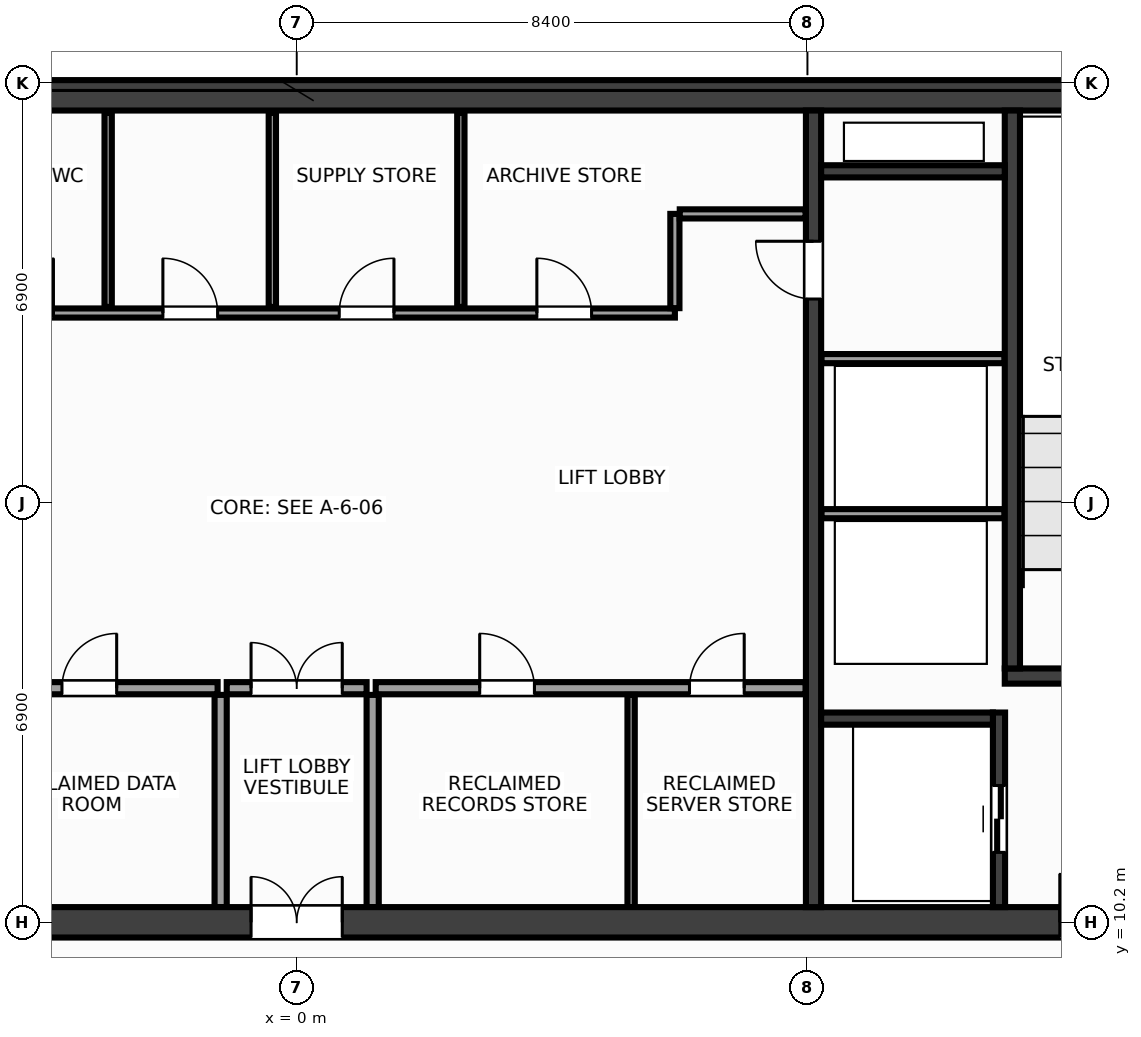
"""IFC4 building model, lengths in metres.
Left out: names, types, materials, properties, quantities, classifications, styles, units other than length and angle.
Written with IfcOpenShell. Run it as: python <this file> out.ifc"""

import sys

from ifc_helpers import new_model, si_unit, direction, frame, frame_2d, origin, place, context, subcontext, project, spatial, rectangle, extrude, source, transform, mapped, element, fill, save


model = new_model("IFC4")
c1 = context("Model", 3, precision=1e-05, world=origin(), true_north=direction((0.0, 1.0)))
c2 = subcontext(c1, "Body", "Model", "MODEL_VIEW")
j1 = project(units=[si_unit("LENGTHUNIT", "METRE"), si_unit("PLANEANGLEUNIT", "RADIAN")], contexts=[c1])
p1 = place(None, origin())
s1 = spatial("IfcSite", under=j1, at=p1, CompositionType="ELEMENT")
p2 = place(p1, origin())
s2 = spatial("IfcBuilding", under=s1, at=p2, CompositionType="ELEMENT")
p3 = place(p2, frame((0.0, 0.0, 225.2)))
s3 = spatial("IfcBuildingStorey", under=s2, at=p3, CompositionType="ELEMENT", Elevation=225.2)
m1 = source(origin(), c2, "Body", "SweptSolid", [
    extrude(rectangle(XDim=31.7, YDim=0.5, at=frame_2d((15.85, 0.0))), origin(), (0.0, 0.0, 1.0), 3.6),
])
p4 = place(p3, frame((-15.85, 23.8, 0.0), z_axis=(0.0, 0.0, 1.0), x_axis=(1.0, 0.0, 0.0)))
e1 = element("IfcWall", 1, at=p4, inside=s3, PredefinedType="SHEAR", context=c2, shape_type="MappedRepresentation", body=[
    mapped(m1, transform((0.0, 0.0, 0.0), x_axis=(1.0, 0.0, 0.0), y_axis=(0.0, 1.0, 0.0), z_axis=(0.0, 0.0, 1.0), scale=1.0)),
])
p5 = place(p3, frame((-15.85, 10.2, 0.0), z_axis=(0.0, 0.0, 1.0), x_axis=(1.0, 0.0, 0.0)))
e2 = element("IfcWall", 2, at=p5, inside=s3, PredefinedType="SHEAR", context=c2, shape_type="MappedRepresentation", body=[
    mapped(m1, transform((0.0, 0.0, 0.0), x_axis=(1.0, 0.0, 0.0), y_axis=(0.0, 1.0, 0.0), z_axis=(0.0, 0.0, 1.0), scale=1.0)),
])
p6 = place(p5, frame((1.7, 0.0, 0.0)))
e3 = element("IfcOpeningElement", 3, at=p6, cuts=e2, PredefinedType="OPENING", context=c2, shape_type="SweptSolid", body=[
    extrude(rectangle(XDim=1.6, YDim=2.15, at=frame_2d((0.8, 1.075))), frame((0.0, 0.262, 0.0), z_axis=(0.0, -1.0, 0.0), x_axis=(1.0, 0.0, 0.0)), (0.0, 0.0, 1.0), 0.524),
])
p7 = place(p5, frame((28.4, 0.0, 0.0)))
e4 = element("IfcOpeningElement", 4, at=p7, cuts=e2, PredefinedType="OPENING", context=c2, shape_type="SweptSolid", body=[
    extrude(rectangle(XDim=1.6, YDim=2.15, at=frame_2d((0.8, 1.075))), frame((0.0, 0.262, 0.0), z_axis=(0.0, -1.0, 0.0), x_axis=(1.0, 0.0, 0.0)), (0.0, 0.0, 1.0), 0.524),
])
p8 = place(p5, frame((15.1, 0.0, 0.0)))
e5 = element("IfcOpeningElement", 5, at=p8, cuts=e2, PredefinedType="OPENING", context=c2, shape_type="SweptSolid", body=[
    extrude(rectangle(XDim=1.5, YDim=2.2, at=frame_2d((0.75, 1.1))), frame((0.0, 0.262, 0.0), z_axis=(0.0, -1.0, 0.0), x_axis=(1.0, 0.0, 0.0)), (0.0, 0.0, 1.0), 0.524),
])
m2 = source(origin(), c2, "Body", "SweptSolid", [
    extrude(rectangle(XDim=13.1, YDim=0.25, at=frame_2d((6.55, 0.0))), origin(), (0.0, 0.0, 1.0), 3.6),
])
p9 = place(p3, frame((8.5, 10.45, 0.0), z_axis=(0.0, 0.0, 1.0), x_axis=(0.0, 1.0, 0.0)))
e6 = element("IfcWall", 6, at=p9, inside=s3, PredefinedType="SHEAR", context=c2, shape_type="MappedRepresentation", body=[
    mapped(m2, transform((0.0, 0.0, 0.0), x_axis=(1.0, 0.0, 0.0), y_axis=(0.0, 1.0, 0.0), z_axis=(0.0, 0.0, 1.0), scale=1.0)),
])
p10 = place(p9, frame((10.0, 0.0, 0.0)))
e7 = element("IfcOpeningElement", 7, at=p10, cuts=e6, PredefinedType="OPENING", context=c2, shape_type="SweptSolid", body=[
    extrude(rectangle(XDim=0.95, YDim=2.15, at=frame_2d((0.475, 1.075))), frame((0.0, 0.137, 0.0), z_axis=(0.0, -1.0, 0.0), x_axis=(1.0, 0.0, 0.0)), (0.0, 0.0, 1.0), 0.274),
])
m3 = source(origin(), c2, "Body", "SweptSolid", [
    extrude(rectangle(XDim=3.705, YDim=0.25, at=frame_2d((1.853, 0.0))), origin(), (0.0, 0.0, 1.0), 3.6),
])
p11 = place(p3, frame((11.645, 14.25, 0.0), z_axis=(0.0, 0.0, 1.0), x_axis=(1.0, 0.0, 0.0)))
e8 = element("IfcWall", 8, at=p11, inside=s3, PredefinedType="SHEAR", context=c2, shape_type="MappedRepresentation", body=[
    mapped(m3, transform((0.0, 0.0, 0.0), x_axis=(1.0, 0.0, 0.0), y_axis=(0.0, 1.0, 0.0), z_axis=(0.0, 0.0, 1.0), scale=1.0)),
])
p12 = place(p11, frame((0.95, 0.0, 0.0)))
e9 = element("IfcOpeningElement", 9, at=p12, cuts=e8, PredefinedType="OPENING", context=c2, shape_type="SweptSolid", body=[
    extrude(rectangle(XDim=1.6, YDim=2.15, at=frame_2d((0.8, 1.075))), frame((0.0, 0.137, 0.0), z_axis=(0.0, -1.0, 0.0), x_axis=(1.0, 0.0, 0.0)), (0.0, 0.0, 1.0), 0.274),
])
m4 = source(origin(), c2, "Body", "SweptSolid", [
    extrude(rectangle(XDim=9.175, YDim=0.25, at=frame_2d((4.587, 0.0))), origin(), (0.0, 0.0, 1.0), 3.6),
])
p13 = place(p3, frame((11.77, 14.375, 0.0), z_axis=(0.0, 0.0, 1.0), x_axis=(0.0, 1.0, 0.0)))
e10 = element("IfcWall", 10, at=p13, inside=s3, PredefinedType="SHEAR", context=c2, shape_type="MappedRepresentation", body=[
    mapped(m4, transform((0.0, 0.0, 0.0), x_axis=(1.0, 0.0, 0.0), y_axis=(0.0, 1.0, 0.0), z_axis=(0.0, 0.0, 1.0), scale=1.0)),
])
m5 = source(origin(), c2, "Body", "SweptSolid", [
    extrude(rectangle(XDim=3.2, YDim=0.2, at=frame_2d((1.6, 0.0))), origin(), (0.0, 0.0, 1.0), 3.6),
])
p14 = place(p3, frame((11.55, 10.45, 0.0), z_axis=(0.0, 0.0, 1.0), x_axis=(0.0, 1.0, 0.0)))
e11 = element("IfcWall", 11, at=p14, inside=s3, PredefinedType="SHEAR", context=c2, shape_type="MappedRepresentation", body=[
    mapped(m5, transform((0.0, 0.0, 0.0), x_axis=(1.0, 0.0, 0.0), y_axis=(0.0, 1.0, 0.0), z_axis=(0.0, 0.0, 1.0), scale=1.0)),
])
p15 = place(p14, frame((0.9, 0.0, 0.0)))
e12 = element("IfcOpeningElement", 12, at=p15, cuts=e11, PredefinedType="OPENING", context=c2, shape_type="SweptSolid", body=[
    extrude(rectangle(XDim=1.1, YDim=2.15, at=frame_2d((0.55, 1.075))), frame((0.0, 0.112, 0.0), z_axis=(0.0, -1.0, 0.0), x_axis=(1.0, 0.0, 0.0)), (0.0, 0.0, 1.0), 0.224),
])
m6 = source(origin(), c2, "Body", "SweptSolid", [
    extrude(rectangle(XDim=2.825, YDim=0.2, at=frame_2d((1.413, 0.0))), origin(), (0.0, 0.0, 1.0), 3.6),
])
p16 = place(p3, frame((8.625, 13.55, 0.0), z_axis=(0.0, 0.0, 1.0), x_axis=(1.0, 0.0, 0.0)))
e13 = element("IfcWall", 13, at=p16, inside=s3, PredefinedType="SHEAR", context=c2, shape_type="MappedRepresentation", body=[
    mapped(m6, transform((0.0, 0.0, 0.0), x_axis=(1.0, 0.0, 0.0), y_axis=(0.0, 1.0, 0.0), z_axis=(0.0, 0.0, 1.0), scale=1.0)),
])
m7 = source(origin(), c2, "Body", "SweptSolid", [
    extrude(rectangle(XDim=3.02, YDim=0.2, at=frame_2d((1.51, 0.0))), origin(), (0.0, 0.0, 1.0), 3.6),
])
p17 = place(p3, frame((8.625, 22.55, 0.0), z_axis=(0.0, 0.0, 1.0), x_axis=(1.0, 0.0, 0.0)))
e14 = element("IfcWall", 14, at=p17, inside=s3, PredefinedType="SHEAR", context=c2, shape_type="MappedRepresentation", body=[
    mapped(m7, transform((0.0, 0.0, 0.0), x_axis=(1.0, 0.0, 0.0), y_axis=(0.0, 1.0, 0.0), z_axis=(0.0, 0.0, 1.0), scale=1.0)),
])
m8 = source(origin(), c2, "Body", "SweptSolid", [
    extrude(rectangle(XDim=3.01, YDim=0.15, at=frame_2d((1.505, 0.0))), origin(), (0.0, 0.0, 1.0), 3.28),
])
for number, where, z_axis, x_axis in (
    (15, (8.63, 16.92, 0.0), (0.0, 0.0, 1.0), (1.0, 0.0, 0.0)),
    (16, (8.63, 19.47, 0.0), (0.0, 0.0, 1.0), (1.0, 0.0, 0.0)),
):
    element("IfcWall", number, at=place(p3, frame(where, z_axis=z_axis, x_axis=x_axis)), inside=s3, PredefinedType="PARTITIONING", context=c2, shape_type="MappedRepresentation", body=[
        mapped(m8, transform((0.0, 0.0, 0.0), x_axis=(1.0, 0.0, 0.0), y_axis=(0.0, 1.0, 0.0), z_axis=(0.0, 0.0, 1.0), scale=1.0)),
    ])
m9 = source(origin(), c2, "Body", "SweptSolid", [
    extrude(rectangle(XDim=7.07, YDim=0.2, at=frame_2d((3.535, 0.0))), origin(), (0.0, 0.0, 1.0), 3.28),
])
p18 = place(p3, frame((-8.37, 14.05, 0.0), z_axis=(0.0, 0.0, 1.0), x_axis=(1.0, 0.0, 0.0)))
e17 = element("IfcWall", 17, at=p18, inside=s3, PredefinedType="PARTITIONING", context=c2, shape_type="MappedRepresentation", body=[
    mapped(m9, transform((0.0, 0.0, 0.0), x_axis=(1.0, 0.0, 0.0), y_axis=(0.0, 1.0, 0.0), z_axis=(0.0, 0.0, 1.0), scale=1.0)),
])
p19 = place(p18, frame((1.06, 0.0, 0.0)))
e18 = element("IfcOpeningElement", 18, at=p19, cuts=e17, PredefinedType="OPENING", context=c2, shape_type="SweptSolid", body=[
    extrude(rectangle(XDim=0.9, YDim=2.15, at=frame_2d((0.45, 1.075))), frame((0.0, 0.112, 0.0), z_axis=(0.0, -1.0, 0.0), x_axis=(1.0, 0.0, 0.0)), (0.0, 0.0, 1.0), 0.224),
])
p20 = place(p18, frame((4.51, 0.0, 0.0)))
e19 = element("IfcOpeningElement", 19, at=p20, cuts=e17, PredefinedType="OPENING", context=c2, shape_type="SweptSolid", body=[
    extrude(rectangle(XDim=0.9, YDim=2.15, at=frame_2d((0.45, 1.075))), frame((0.0, 0.112, 0.0), z_axis=(0.0, -1.0, 0.0), x_axis=(1.0, 0.0, 0.0)), (0.0, 0.0, 1.0), 0.224),
])
p21 = place(p3, frame((1.3, 14.05, 0.0), z_axis=(0.0, 0.0, 1.0), x_axis=(1.0, 0.0, 0.0)))
e20 = element("IfcWall", 20, at=p21, inside=s3, PredefinedType="PARTITIONING", context=c2, shape_type="MappedRepresentation", body=[
    mapped(m9, transform((0.0, 0.0, 0.0), x_axis=(1.0, 0.0, 0.0), y_axis=(0.0, 1.0, 0.0), z_axis=(0.0, 0.0, 1.0), scale=1.0)),
])
p22 = place(p21, frame((1.71, 0.0, 0.0)))
e21 = element("IfcOpeningElement", 21, at=p22, cuts=e20, PredefinedType="OPENING", context=c2, shape_type="SweptSolid", body=[
    extrude(rectangle(XDim=0.9, YDim=2.15, at=frame_2d((0.45, 1.075))), frame((0.0, 0.112, 0.0), z_axis=(0.0, -1.0, 0.0), x_axis=(1.0, 0.0, 0.0)), (0.0, 0.0, 1.0), 0.224),
])
p23 = place(p21, frame((5.16, 0.0, 0.0)))
e22 = element("IfcOpeningElement", 22, at=p23, cuts=e20, PredefinedType="OPENING", context=c2, shape_type="SweptSolid", body=[
    extrude(rectangle(XDim=0.9, YDim=2.15, at=frame_2d((0.45, 1.075))), frame((0.0, 0.112, 0.0), z_axis=(0.0, -1.0, 0.0), x_axis=(1.0, 0.0, 0.0)), (0.0, 0.0, 1.0), 0.224),
])
m10 = source(origin(), c2, "Body", "SweptSolid", [
    extrude(rectangle(XDim=3.49, YDim=0.2, at=frame_2d((1.745, 0.0))), origin(), (0.0, 0.0, 1.0), 3.28),
])
for number, where, z_axis, x_axis in (
    (23, (-1.25, 10.45, 0.0), (0.0, 0.0, 1.0), (0.0, 1.0, 0.0)),
    (24, (1.25, 10.45, 0.0), (0.0, 0.0, 1.0), (0.0, 1.0, 0.0)),
):
    element("IfcWall", number, at=place(p3, frame(where, z_axis=z_axis, x_axis=x_axis)), inside=s3, PredefinedType="PARTITIONING", context=c2, shape_type="MappedRepresentation", body=[
        mapped(m10, transform((0.0, 0.0, 0.0), x_axis=(1.0, 0.0, 0.0), y_axis=(0.0, 1.0, 0.0), z_axis=(0.0, 0.0, 1.0), scale=1.0)),
    ])
m11 = source(origin(), c2, "Body", "SweptSolid", [
    extrude(rectangle(XDim=2.3, YDim=0.2, at=frame_2d((1.15, 0.0))), origin(), (0.0, 0.0, 1.0), 3.28),
])
p24 = place(p3, frame((-1.15, 14.05, 0.0), z_axis=(0.0, 0.0, 1.0), x_axis=(1.0, 0.0, 0.0)))
e25 = element("IfcWall", 25, at=p24, inside=s3, PredefinedType="PARTITIONING", context=c2, shape_type="MappedRepresentation", body=[
    mapped(m11, transform((0.0, 0.0, 0.0), x_axis=(1.0, 0.0, 0.0), y_axis=(0.0, 1.0, 0.0), z_axis=(0.0, 0.0, 1.0), scale=1.0)),
])
p25 = place(p24, frame((0.4, 0.0, 0.0)))
e26 = element("IfcOpeningElement", 26, at=p25, cuts=e25, PredefinedType="OPENING", context=c2, shape_type="SweptSolid", body=[
    extrude(rectangle(XDim=1.5, YDim=2.2, at=frame_2d((0.75, 1.1))), frame((0.0, 0.112, 0.0), z_axis=(0.0, -1.0, 0.0), x_axis=(1.0, 0.0, 0.0)), (0.0, 0.0, 1.0), 0.224),
])
m12 = source(origin(), c2, "Body", "SweptSolid", [
    extrude(rectangle(XDim=14.59, YDim=0.15, at=frame_2d((7.295, 0.0))), origin(), (0.0, 0.0, 1.0), 3.28),
])
p26 = place(p3, frame((-8.37, 20.22, 0.0), z_axis=(0.0, 0.0, 1.0), x_axis=(1.0, 0.0, 0.0)))
e27 = element("IfcWall", 27, at=p26, inside=s3, PredefinedType="PARTITIONING", context=c2, shape_type="MappedRepresentation", body=[
    mapped(m12, transform((0.0, 0.0, 0.0), x_axis=(1.0, 0.0, 0.0), y_axis=(0.0, 1.0, 0.0), z_axis=(0.0, 0.0, 1.0), scale=1.0)),
])
p27 = place(p26, frame((0.86, 0.0, 0.0)))
e28 = element("IfcOpeningElement", 28, at=p27, cuts=e27, PredefinedType="OPENING", context=c2, shape_type="SweptSolid", body=[
    extrude(rectangle(XDim=0.9, YDim=2.15, at=frame_2d((0.45, 1.075))), frame((0.0, 0.087, 0.0), z_axis=(0.0, -1.0, 0.0), x_axis=(1.0, 0.0, 0.0)), (0.0, 0.0, 1.0), 0.174),
])
p28 = place(p26, frame((3.47, 0.0, 0.0)))
e29 = element("IfcOpeningElement", 29, at=p28, cuts=e27, PredefinedType="OPENING", context=c2, shape_type="SweptSolid", body=[
    extrude(rectangle(XDim=0.9, YDim=2.15, at=frame_2d((0.45, 1.075))), frame((0.0, 0.087, 0.0), z_axis=(0.0, -1.0, 0.0), x_axis=(1.0, 0.0, 0.0)), (0.0, 0.0, 1.0), 0.174),
])
p29 = place(p26, frame((6.17, 0.0, 0.0)))
e30 = element("IfcOpeningElement", 30, at=p29, cuts=e27, PredefinedType="OPENING", context=c2, shape_type="SweptSolid", body=[
    extrude(rectangle(XDim=0.9, YDim=2.15, at=frame_2d((0.45, 1.075))), frame((0.0, 0.087, 0.0), z_axis=(0.0, -1.0, 0.0), x_axis=(1.0, 0.0, 0.0)), (0.0, 0.0, 1.0), 0.174),
])
p30 = place(p26, frame((9.07, 0.0, 0.0)))
e31 = element("IfcOpeningElement", 31, at=p30, cuts=e27, PredefinedType="OPENING", context=c2, shape_type="SweptSolid", body=[
    extrude(rectangle(XDim=0.9, YDim=2.15, at=frame_2d((0.45, 1.075))), frame((0.0, 0.087, 0.0), z_axis=(0.0, -1.0, 0.0), x_axis=(1.0, 0.0, 0.0)), (0.0, 0.0, 1.0), 0.174),
])
p31 = place(p26, frame((12.32, 0.0, 0.0)))
e32 = element("IfcOpeningElement", 32, at=p31, cuts=e27, PredefinedType="OPENING", context=c2, shape_type="SweptSolid", body=[
    extrude(rectangle(XDim=0.9, YDim=2.15, at=frame_2d((0.45, 1.075))), frame((0.0, 0.087, 0.0), z_axis=(0.0, -1.0, 0.0), x_axis=(1.0, 0.0, 0.0)), (0.0, 0.0, 1.0), 0.174),
])
m13 = source(origin(), c2, "Body", "SweptSolid", [
    extrude(rectangle(XDim=1.55, YDim=0.15, at=frame_2d((0.775, 0.0))), origin(), (0.0, 0.0, 1.0), 3.28),
])
p32 = place(p3, frame((6.22, 20.3, 0.0), z_axis=(0.0, 0.0, 1.0), x_axis=(0.0, 1.0, 0.0)))
e33 = element("IfcWall", 33, at=p32, inside=s3, PredefinedType="PARTITIONING", context=c2, shape_type="MappedRepresentation", body=[
    mapped(m13, transform((0.0, 0.0, 0.0), x_axis=(1.0, 0.0, 0.0), y_axis=(0.0, 1.0, 0.0), z_axis=(0.0, 0.0, 1.0), scale=1.0)),
])
m14 = source(origin(), c2, "Body", "SweptSolid", [
    extrude(rectangle(XDim=2.07, YDim=0.15, at=frame_2d((1.035, 0.0))), origin(), (0.0, 0.0, 1.0), 3.28),
])
p33 = place(p3, frame((6.3, 21.85, 0.0), z_axis=(0.0, 0.0, 1.0), x_axis=(1.0, 0.0, 0.0)))
e34 = element("IfcWall", 34, at=p33, inside=s3, PredefinedType="PARTITIONING", context=c2, shape_type="MappedRepresentation", body=[
    mapped(m14, transform((0.0, 0.0, 0.0), x_axis=(1.0, 0.0, 0.0), y_axis=(0.0, 1.0, 0.0), z_axis=(0.0, 0.0, 1.0), scale=1.0)),
])
m15 = source(origin(), c2, "Body", "SweptSolid", [
    extrude(rectangle(XDim=3.49, YDim=0.12, at=frame_2d((1.745, 0.0))), origin(), (0.0, 0.0, 1.0), 3.28),
])
p34 = place(p3, frame((5.5, 10.45, 0.0), z_axis=(0.0, 0.0, 1.0), x_axis=(0.0, 1.0, 0.0)))
e35 = element("IfcWall", 35, at=p34, inside=s3, PredefinedType="PARTITIONING", context=c2, shape_type="MappedRepresentation", body=[
    mapped(m15, transform((0.0, 0.0, 0.0), x_axis=(1.0, 0.0, 0.0), y_axis=(0.0, 1.0, 0.0), z_axis=(0.0, 0.0, 1.0), scale=1.0)),
])
m16 = source(origin(), c2, "Body", "SweptSolid", [
    extrude(rectangle(XDim=3.19, YDim=0.12, at=frame_2d((1.595, 0.0))), origin(), (0.0, 0.0, 1.0), 3.28),
])
for number, where, z_axis, x_axis in (
    (36, (-3.1, 20.32, 0.0), (0.0, 0.0, 1.0), (0.0, 1.0, 0.0)),
    (37, (-0.4, 20.32, 0.0), (0.0, 0.0, 1.0), (0.0, 1.0, 0.0)),
    (38, (2.7, 20.32, 0.0), (0.0, 0.0, 1.0), (0.0, 1.0, 0.0)),
):
    element("IfcWall", number, at=place(p3, frame(where, z_axis=z_axis, x_axis=x_axis)), inside=s3, PredefinedType="PARTITIONING", context=c2, shape_type="MappedRepresentation", body=[
        mapped(m16, transform((0.0, 0.0, 0.0), x_axis=(1.0, 0.0, 0.0), y_axis=(0.0, 1.0, 0.0), z_axis=(0.0, 0.0, 1.0), scale=1.0)),
    ])
m17 = source(origin(), c2, "Body", "SweptSolid", [
    extrude(rectangle(XDim=1.6, YDim=2.15, at=frame_2d((0.8, 1.075))), frame((0.0, 0.025, 0.0), z_axis=(0.0, -1.0, 0.0), x_axis=(1.0, 0.0, 0.0)), (0.0, 0.0, 1.0), 0.05),
])
p35 = place(p7, origin())
e39 = element("IfcDoor", 39, at=p35, inside=s3, OperationType="DOUBLE_DOOR_SINGLE_SWING", PredefinedType="DOOR", context=c2, shape_type="MappedRepresentation", body=[
    mapped(m17, transform((0.0, 0.0, 0.0), x_axis=(1.0, 0.0, 0.0), y_axis=(0.0, 1.0, 0.0), z_axis=(0.0, 0.0, 1.0), scale=1.0)),
])
fill(e4, e39)
m18 = source(origin(), c2, "Body", "SweptSolid", [
    extrude(rectangle(XDim=1.1, YDim=2.15, at=frame_2d((0.55, 1.075))), frame((0.0, 0.025, 0.0), z_axis=(0.0, -1.0, 0.0), x_axis=(1.0, 0.0, 0.0)), (0.0, 0.0, 1.0), 0.05),
])
p36 = place(p15, origin())
e40 = element("IfcDoor", 40, at=p36, inside=s3, OperationType="DOUBLE_DOOR_SLIDING", PredefinedType="DOOR", context=c2, shape_type="MappedRepresentation", body=[
    mapped(m18, transform((0.0, 0.0, 0.0), x_axis=(1.0, 0.0, 0.0), y_axis=(0.0, 1.0, 0.0), z_axis=(0.0, 0.0, 1.0), scale=1.0)),
])
fill(e12, e40)
m19 = source(origin(), c2, "Body", "SweptSolid", [
    extrude(rectangle(XDim=0.95, YDim=2.15, at=frame_2d((0.475, 1.075))), frame((0.0, 0.025, 0.0), z_axis=(0.0, -1.0, 0.0), x_axis=(1.0, 0.0, 0.0)), (0.0, 0.0, 1.0), 0.05),
])
p37 = place(p10, origin())
e41 = element("IfcDoor", 41, at=p37, inside=s3, OperationType="SINGLE_SWING_RIGHT", PredefinedType="DOOR", context=c2, shape_type="MappedRepresentation", body=[
    mapped(m19, transform((0.0, 0.0, 0.0), x_axis=(1.0, 0.0, 0.0), y_axis=(0.0, 1.0, 0.0), z_axis=(0.0, 0.0, 1.0), scale=1.0)),
])
fill(e7, e41)
m20 = source(origin(), c2, "Body", "SweptSolid", [
    extrude(rectangle(XDim=0.9, YDim=2.15, at=frame_2d((0.45, 1.075))), frame((0.0, 0.025, 0.0), z_axis=(0.0, -1.0, 0.0), x_axis=(1.0, 0.0, 0.0)), (0.0, 0.0, 1.0), 0.05),
])
p38 = place(p20, origin())
e42 = element("IfcDoor", 42, at=p38, inside=s3, OperationType="SINGLE_SWING_RIGHT", PredefinedType="DOOR", context=c2, shape_type="MappedRepresentation", body=[
    mapped(m20, transform((0.0, 0.0, 0.0), x_axis=(1.0, 0.0, 0.0), y_axis=(0.0, 1.0, 0.0), z_axis=(0.0, 0.0, 1.0), scale=1.0)),
])
fill(e19, e42)
p39 = place(p22, origin())
e43 = element("IfcDoor", 43, at=p39, inside=s3, OperationType="SINGLE_SWING_LEFT", PredefinedType="DOOR", context=c2, shape_type="MappedRepresentation", body=[
    mapped(m20, transform((0.0, 0.0, 0.0), x_axis=(1.0, 0.0, 0.0), y_axis=(0.0, 1.0, 0.0), z_axis=(0.0, 0.0, 1.0), scale=1.0)),
])
fill(e21, e43)
p40 = place(p23, origin())
e44 = element("IfcDoor", 44, at=p40, inside=s3, OperationType="SINGLE_SWING_RIGHT", PredefinedType="DOOR", context=c2, shape_type="MappedRepresentation", body=[
    mapped(m20, transform((0.0, 0.0, 0.0), x_axis=(1.0, 0.0, 0.0), y_axis=(0.0, 1.0, 0.0), z_axis=(0.0, 0.0, 1.0), scale=1.0)),
])
fill(e22, e44)
m21 = source(origin(), c2, "Body", "SweptSolid", [
    extrude(rectangle(XDim=1.5, YDim=2.2, at=frame_2d((0.75, 1.1))), frame((0.0, 0.025, 0.0), z_axis=(0.0, -1.0, 0.0), x_axis=(1.0, 0.0, 0.0)), (0.0, 0.0, 1.0), 0.05),
])
p41 = place(p25, origin())
e45 = element("IfcDoor", 45, at=p41, inside=s3, OperationType="DOUBLE_DOOR_SINGLE_SWING", PredefinedType="DOOR", context=c2, shape_type="MappedRepresentation", body=[
    mapped(m21, transform((0.0, 0.0, 0.0), x_axis=(1.0, 0.0, 0.0), y_axis=(0.0, 1.0, 0.0), z_axis=(0.0, 0.0, 1.0), scale=1.0)),
])
fill(e26, e45)
p42 = place(p8, origin())
e46 = element("IfcDoor", 46, at=p42, inside=s3, OperationType="DOUBLE_DOOR_SINGLE_SWING", PredefinedType="DOOR", context=c2, shape_type="MappedRepresentation", body=[
    mapped(m21, transform((0.0, 0.0, 0.0), x_axis=(1.0, 0.0, 0.0), y_axis=(0.0, 1.0, 0.0), z_axis=(0.0, 0.0, 1.0), scale=1.0)),
])
fill(e5, e46)
p43 = place(p28, origin())
e47 = element("IfcDoor", 47, at=p43, inside=s3, OperationType="SINGLE_SWING_RIGHT", PredefinedType="DOOR", context=c2, shape_type="MappedRepresentation", body=[
    mapped(m20, transform((0.0, 0.0, 0.0), x_axis=(1.0, 0.0, 0.0), y_axis=(0.0, 1.0, 0.0), z_axis=(0.0, 0.0, 1.0), scale=1.0)),
])
fill(e29, e47)
p44 = place(p29, origin())
e48 = element("IfcDoor", 48, at=p44, inside=s3, OperationType="SINGLE_SWING_LEFT", PredefinedType="DOOR", context=c2, shape_type="MappedRepresentation", body=[
    mapped(m20, transform((0.0, 0.0, 0.0), x_axis=(1.0, 0.0, 0.0), y_axis=(0.0, 1.0, 0.0), z_axis=(0.0, 0.0, 1.0), scale=1.0)),
])
fill(e30, e48)
p45 = place(p30, origin())
e49 = element("IfcDoor", 49, at=p45, inside=s3, OperationType="SINGLE_SWING_RIGHT", PredefinedType="DOOR", context=c2, shape_type="MappedRepresentation", body=[
    mapped(m20, transform((0.0, 0.0, 0.0), x_axis=(1.0, 0.0, 0.0), y_axis=(0.0, 1.0, 0.0), z_axis=(0.0, 0.0, 1.0), scale=1.0)),
])
fill(e31, e49)
p46 = place(p31, origin())
e50 = element("IfcDoor", 50, at=p46, inside=s3, OperationType="SINGLE_SWING_LEFT", PredefinedType="DOOR", context=c2, shape_type="MappedRepresentation", body=[
    mapped(m20, transform((0.0, 0.0, 0.0), x_axis=(1.0, 0.0, 0.0), y_axis=(0.0, 1.0, 0.0), z_axis=(0.0, 0.0, 1.0), scale=1.0)),
])
fill(e32, e50)
save(model, sys.argv[1])
